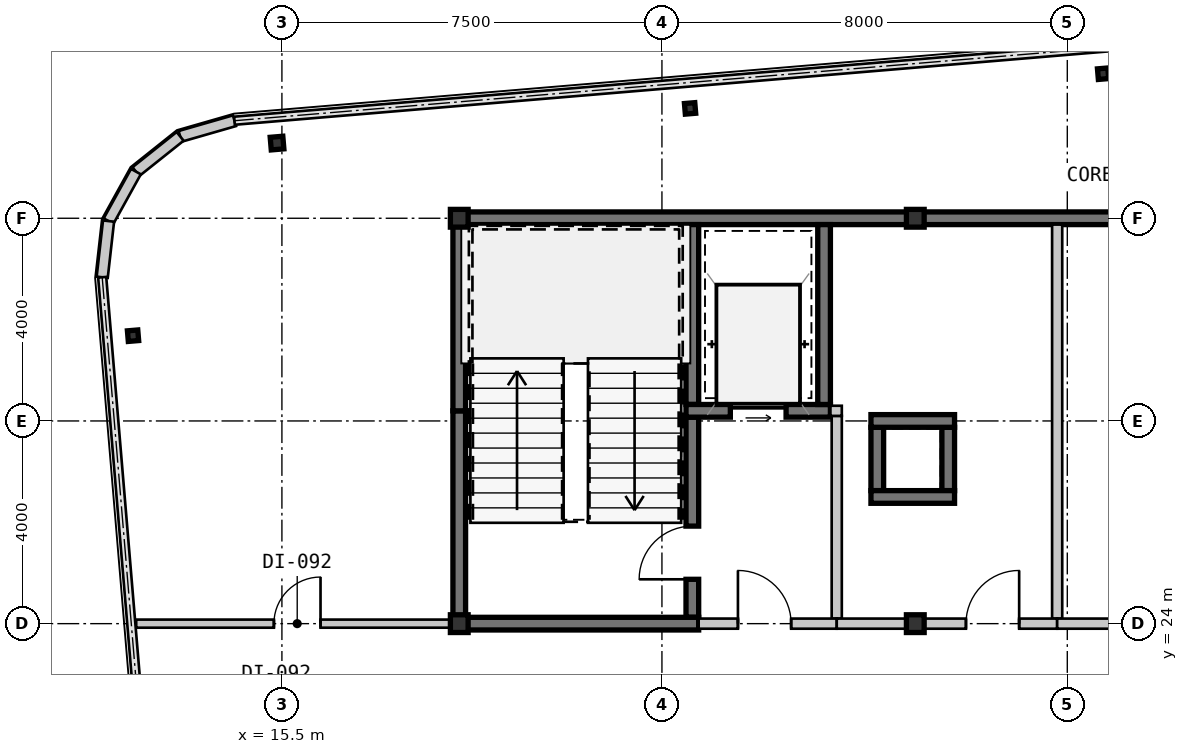
"""IFC4 building model, lengths in metres.
Left out: names, types, materials, properties, quantities, classifications, styles, units other than length and angle.
Written with IfcOpenShell. Run it as: python <this file> out.ifc"""

import sys

from ifc_helpers import new_model, si_unit, direction, frame, frame_2d, origin, origin_2d, place, context, subcontext, project, spatial, rectangle, hollow_rectangle, i_section, extrude, source, transform, mapped, element, fill, save


model = new_model("IFC4")
c1 = context("Model", 3, precision=1e-05, world=origin(), true_north=direction((0.0, 1.0)))
c2 = subcontext(c1, "Body", "Model", "MODEL_VIEW")
j1 = project(units=[si_unit("LENGTHUNIT", "METRE"), si_unit("PLANEANGLEUNIT", "RADIAN")], contexts=[c1])
p1 = place(None, origin())
s1 = spatial("IfcSite", under=j1, at=p1, CompositionType="ELEMENT")
p2 = place(p1, origin())
s2 = spatial("IfcBuilding", under=s1, at=p2, CompositionType="ELEMENT")
p3 = place(p2, frame((0.0, 0.0, 191.45)))
s3 = spatial("IfcBuildingStorey", under=s2, at=p3, CompositionType="ELEMENT", Elevation=191.45)
m1 = source(origin(), c2, "Body", "SweptSolid", [
    extrude(hollow_rectangle(XDim=0.35, YDim=0.35, WallThickness=0.016, at=origin_2d()), origin(), (0.0, 0.0, 1.0), 3.15),
])
for number, where, z_axis, x_axis in (
    (1, (19.0, 24.0, 0.0), (0.0, 0.0, 1.0), (1.0, 0.0, 0.0)),
    (2, (28.0, 24.0, 0.0), (0.0, 0.0, 1.0), (1.0, 0.0, 0.0)),
    (3, (19.0, 32.0, 0.0), (0.0, 0.0, 1.0), (1.0, 0.0, 0.0)),
    (4, (28.0, 32.0, 0.0), (0.0, 0.0, 1.0), (1.0, 0.0, 0.0)),
):
    element("IfcColumn", number, at=place(p3, frame(where, z_axis=z_axis, x_axis=x_axis)), inside=s3, PredefinedType="COLUMN", context=c2, shape_type="MappedRepresentation", body=[
        mapped(m1, transform((0.0, 0.0, 0.0), scale=1.0)),
    ])
m2 = source(origin(), c2, "Body", "SweptSolid", [
    extrude(hollow_rectangle(XDim=0.25, YDim=0.25, WallThickness=0.01, at=origin_2d()), origin(), (0.0, 0.0, 1.0), 3.15),
])
p4 = place(p3, frame((15.404, 33.484, 0.0), z_axis=(0.0, 0.0, 1.0), x_axis=(0.99649285925, 0.083677843332, 0.0)))
e5 = element("IfcColumn", 5, at=p4, inside=s3, PredefinedType="COLUMN", context=c2, shape_type="MappedRepresentation", body=[
    mapped(m2, transform((0.0, 0.0, 0.0), scale=1.0)),
])
m3 = source(origin(), c2, "Body", "SweptSolid", [
    extrude(i_section(OverallWidth=0.205, OverallDepth=0.21, WebThickness=0.009, FlangeThickness=0.014, at=origin_2d()), origin(), (0.0, 0.0, 1.0), 3.15),
])
for number, where, z_axis, x_axis in (
    (6, (23.555, 34.168, 0.0), (0.0, 0.0, 1.0), (0.996, 0.084, 0.0)),
    (7, (31.706, 34.853, 0.0), (0.0, 0.0, 1.0), (0.996, 0.084, 0.0)),
    (8, (12.562, 29.682, 0.0), (0.0, 0.0, 1.0), (0.996, 0.084, 0.0)),
):
    element("IfcColumn", number, at=place(p3, frame(where, z_axis=z_axis, x_axis=x_axis)), inside=s3, PredefinedType="COLUMN", context=c2, shape_type="MappedRepresentation", body=[
        mapped(m3, transform((0.0, 0.0, 0.0), scale=1.0)),
    ])
m4 = source(origin(), c2, "Body", "SweptSolid", [
    extrude(rectangle(XDim=1.116, YDim=0.22, at=frame_2d((0.558, 0.0))), origin(), (0.0, 0.0, 1.0), 2.93),
])
p5 = place(p3, frame((14.564, 33.925, 0.0), z_axis=(0.0, 0.0, 1.0), x_axis=(-0.961010464297, -0.276512002475, 0.0)))
e9 = element("IfcWall", 9, at=p5, inside=s3, PredefinedType="SOLIDWALL", context=c2, shape_type="MappedRepresentation", body=[
    mapped(m4, transform((0.0, 0.0, 0.0), scale=1.0)),
])
m5 = source(origin(), c2, "Body", "SweptSolid", [
    extrude(rectangle(XDim=1.116, YDim=0.22, at=frame_2d((0.558, 0.0))), origin(), (0.0, 0.0, 1.0), 2.93),
])
p6 = place(p3, frame((13.491, 33.616, 0.0), z_axis=(0.0, 0.0, 1.0), x_axis=(-0.782062884215, -0.623199522732, 0.0)))
e10 = element("IfcWall", 10, at=p6, inside=s3, PredefinedType="SOLIDWALL", context=c2, shape_type="MappedRepresentation", body=[
    mapped(m5, transform((0.0, 0.0, 0.0), scale=1.0)),
])
for number, where, z_axis, x_axis in (
    (11, (12.619, 32.921, 0.0), (0.0, 0.0, 1.0), (-0.484, -0.875, 0.0)),
    (12, (12.079, 31.944, 0.0), (0.0, 0.0, 1.0), (-0.112, -0.994, 0.0)),
):
    element("IfcWall", number, at=place(p3, frame(where, z_axis=z_axis, x_axis=x_axis)), inside=s3, PredefinedType="SOLIDWALL", context=c2, shape_type="MappedRepresentation", body=[
        mapped(m4, transform((0.0, 0.0, 0.0), scale=1.0)),
    ])
m6 = source(origin(), c2, "Body", "SweptSolid", [
    extrude(rectangle(XDim=9.125, YDim=0.25, at=frame_2d((4.562, 0.0))), origin(), (0.0, 0.0, 1.0), 2.93),
])
p7 = place(p3, frame((18.875, 32.0, 0.0), z_axis=(0.0, 0.0, 1.0), x_axis=(1.0, 0.0, 0.0)))
e13 = element("IfcWall", 13, at=p7, inside=s3, PredefinedType="SHEAR", context=c2, shape_type="MappedRepresentation", body=[
    mapped(m6, transform((0.0, 0.0, 0.0), scale=1.0)),
])
m7 = source(origin(), c2, "Body", "SweptSolid", [
    extrude(rectangle(XDim=11.2, YDim=0.25, at=frame_2d((5.6, 0.0))), origin(), (0.0, 0.0, 1.0), 2.93),
])
p8 = place(p3, frame((28.0, 32.0, 0.0), z_axis=(0.0, 0.0, 1.0), x_axis=(1.0, 0.0, 0.0)))
e14 = element("IfcWall", 14, at=p8, inside=s3, PredefinedType="SHEAR", context=c2, shape_type="MappedRepresentation", body=[
    mapped(m7, transform((0.0, 0.0, 0.0), scale=1.0)),
])
m8 = source(origin(), c2, "Body", "SweptSolid", [
    extrude(rectangle(XDim=4.075, YDim=0.25, at=frame_2d((2.038, 0.0))), origin(), (0.0, 0.0, 1.0), 2.93),
])
p9 = place(p3, frame((19.0, 24.125, 0.0), z_axis=(0.0, 0.0, 1.0), x_axis=(0.0, 1.0, 0.0)))
e15 = element("IfcWall", 15, at=p9, inside=s3, PredefinedType="SHEAR", context=c2, shape_type="MappedRepresentation", body=[
    mapped(m8, transform((0.0, 0.0, 0.0), scale=1.0)),
])
m9 = source(origin(), c2, "Body", "SweptSolid", [
    extrude(rectangle(XDim=3.675, YDim=0.25, at=frame_2d((1.837, 0.0))), origin(), (0.0, 0.0, 1.0), 2.93),
])
p10 = place(p3, frame((19.0, 28.2, 0.0), z_axis=(0.0, 0.0, 1.0), x_axis=(0.0, 1.0, 0.0)))
e16 = element("IfcWall", 16, at=p10, inside=s3, PredefinedType="SHEAR", context=c2, shape_type="MappedRepresentation", body=[
    mapped(m9, transform((0.0, 0.0, 0.0), scale=1.0)),
])
m10 = source(origin(), c2, "Body", "SweptSolid", [
    extrude(rectangle(XDim=3.55, YDim=0.25, at=frame_2d((1.775, 0.0))), origin(), (0.0, 0.0, 1.0), 2.93),
])
p11 = place(p3, frame((23.6, 28.325, 0.0), z_axis=(0.0, 0.0, 1.0), x_axis=(0.0, 1.0, 0.0)))
e17 = element("IfcWall", 17, at=p11, inside=s3, PredefinedType="SHEAR", context=c2, shape_type="MappedRepresentation", body=[
    mapped(m10, transform((0.0, 0.0, 0.0), scale=1.0)),
])
m11 = source(origin(), c2, "Body", "SweptSolid", [
    extrude(rectangle(XDim=3.95, YDim=0.25, at=frame_2d((1.975, 0.0))), origin(), (0.0, 0.0, 1.0), 2.93),
])
p12 = place(p3, frame((23.6, 24.125, 0.0), z_axis=(0.0, 0.0, 1.0), x_axis=(0.0, 1.0, 0.0)))
e18 = element("IfcWall", 18, at=p12, inside=s3, PredefinedType="SHEAR", context=c2, shape_type="MappedRepresentation", body=[
    mapped(m11, transform((0.0, 0.0, 0.0), scale=1.0)),
])
m12 = source(origin(), c2, "Body", "SweptSolid", [
    extrude(rectangle(XDim=1.05, YDim=2.1, at=frame_2d((0.525, 1.05))), frame((0.0, 0.135, 0.0), z_axis=(0.0, -1.0, 0.0), x_axis=(1.0, 0.0, 0.0)), (0.0, 0.0, 1.0), 0.27),
])
p13 = place(p12, frame((0.75, 0.0, 0.0)))
e19 = element("IfcOpeningElement", 19, at=p13, cuts=e18, PredefinedType="OPENING", context=c2, shape_type="MappedRepresentation", body=[
    mapped(m12, transform((0.0, 0.0, 0.0), scale=1.0)),
])
m13 = source(origin(), c2, "Body", "SweptSolid", [
    extrude(rectangle(XDim=4.85, YDim=0.25, at=frame_2d((2.425, 0.0))), origin(), (0.0, 0.0, 1.0), 2.93),
])
p14 = place(p3, frame((18.875, 24.0, 0.0), z_axis=(0.0, 0.0, 1.0), x_axis=(1.0, 0.0, 0.0)))
e20 = element("IfcWall", 20, at=p14, inside=s3, PredefinedType="SHEAR", context=c2, shape_type="MappedRepresentation", body=[
    mapped(m13, transform((0.0, 0.0, 0.0), scale=1.0)),
])
m14 = source(origin(), c2, "Body", "SweptSolid", [
    extrude(rectangle(XDim=2.85, YDim=0.25, at=frame_2d((1.425, 0.0))), origin(), (0.0, 0.0, 1.0), 2.93),
])
p15 = place(p3, frame((23.475, 28.2, 0.0), z_axis=(0.0, 0.0, 1.0), x_axis=(1.0, 0.0, 0.0)))
e21 = element("IfcWall", 21, at=p15, inside=s3, PredefinedType="SHEAR", context=c2, shape_type="MappedRepresentation", body=[
    mapped(m14, transform((0.0, 0.0, 0.0), scale=1.0)),
])
m15 = source(origin(), c2, "Body", "SweptSolid", [
    extrude(rectangle(XDim=1.1, YDim=2.15, at=frame_2d((0.55, 1.075))), frame((0.0, 0.135, 0.0), z_axis=(0.0, -1.0, 0.0), x_axis=(1.0, 0.0, 0.0)), (0.0, 0.0, 1.0), 0.27),
])
p16 = place(p15, frame((0.875, 0.0, 0.0)))
e22 = element("IfcOpeningElement", 22, at=p16, cuts=e21, PredefinedType="OPENING", context=c2, shape_type="MappedRepresentation", body=[
    mapped(m15, transform((0.0, 0.0, 0.0), scale=1.0)),
])
p17 = place(p3, frame((26.2, 28.325, 0.0), z_axis=(0.0, 0.0, 1.0), x_axis=(0.0, 1.0, 0.0)))
e23 = element("IfcWall", 23, at=p17, inside=s3, PredefinedType="SHEAR", context=c2, shape_type="MappedRepresentation", body=[
    mapped(m10, transform((0.0, 0.0, 0.0), scale=1.0)),
])
m16 = source(origin(), c2, "Body", "SweptSolid", [
    extrude(rectangle(XDim=4.0, YDim=0.2, at=frame_2d((2.0, 0.0))), origin(), (0.0, 0.0, 1.0), 2.93),
])
p18 = place(p3, frame((26.45, 24.1, 0.0), z_axis=(0.0, 0.0, 1.0), x_axis=(0.0, 1.0, 0.0)))
e24 = element("IfcWall", 24, at=p18, inside=s3, PredefinedType="SOLIDWALL", context=c2, shape_type="MappedRepresentation", body=[
    mapped(m16, transform((0.0, 0.0, 0.0), scale=1.0)),
])
m17 = source(origin(), c2, "Body", "SweptSolid", [
    extrude(rectangle(XDim=2.725, YDim=0.2, at=frame_2d((1.362, 0.0))), origin(), (0.0, 0.0, 1.0), 2.47),
])
p19 = place(p3, frame((23.725, 24.0, 0.0), z_axis=(0.0, 0.0, 1.0), x_axis=(1.0, 0.0, 0.0)))
e25 = element("IfcWall", 25, at=p19, inside=s3, PredefinedType="SOLIDWALL", context=c2, shape_type="MappedRepresentation", body=[
    mapped(m17, transform((0.0, 0.0, 0.0), scale=1.0)),
])
m18 = source(origin(), c2, "Body", "SweptSolid", [
    extrude(rectangle(XDim=1.05, YDim=2.1, at=frame_2d((0.525, 1.05))), frame((0.0, 0.11, 0.0), z_axis=(0.0, -1.0, 0.0), x_axis=(1.0, 0.0, 0.0)), (0.0, 0.0, 1.0), 0.22),
])
p20 = place(p19, frame((0.775, 0.0, 0.0)))
e26 = element("IfcOpeningElement", 26, at=p20, cuts=e25, PredefinedType="OPENING", context=c2, shape_type="MappedRepresentation", body=[
    mapped(m18, transform((0.0, 0.0, 0.0), scale=1.0)),
])
m19 = source(origin(), c2, "Body", "SweptSolid", [
    extrude(rectangle(XDim=1.25, YDim=0.25, at=frame_2d((0.625, 0.0))), origin(), (0.0, 0.0, 1.0), 2.93),
])
for number, where, z_axis, x_axis in (
    (27, (28.65, 26.625, 0.0), (0.0, 0.0, 1.0), (0.0, 1.0, 0.0)),
    (28, (27.25, 27.875, 0.0), (0.0, 0.0, 1.0), (0.0, -1.0, 0.0)),
):
    element("IfcWall", number, at=place(p3, frame(where, z_axis=z_axis, x_axis=x_axis)), inside=s3, PredefinedType="SHEAR", context=c2, shape_type="MappedRepresentation", body=[
        mapped(m19, transform((0.0, 0.0, 0.0), scale=1.0)),
    ])
m20 = source(origin(), c2, "Body", "SweptSolid", [
    extrude(rectangle(XDim=1.65, YDim=0.25, at=frame_2d((0.825, 0.0))), origin(), (0.0, 0.0, 1.0), 2.93),
])
for number, where, z_axis, x_axis in (
    (29, (28.775, 28.0, 0.0), (0.0, 0.0, 1.0), (-1.0, 0.0, 0.0)),
    (30, (27.125, 26.5, 0.0), (0.0, 0.0, 1.0), (1.0, 0.0, 0.0)),
):
    element("IfcWall", number, at=place(p3, frame(where, z_axis=z_axis, x_axis=x_axis)), inside=s3, PredefinedType="SHEAR", context=c2, shape_type="MappedRepresentation", body=[
        mapped(m20, transform((0.0, 0.0, 0.0), scale=1.0)),
    ])
m21 = source(origin(), c2, "Body", "SweptSolid", [
    extrude(rectangle(XDim=7.775, YDim=0.2, at=frame_2d((3.887, 0.0))), origin(), (0.0, 0.0, 1.0), 2.93),
])
p21 = place(p3, frame((30.8, 31.875, 0.0), z_axis=(0.0, 0.0, 1.0), x_axis=(0.0, -1.0, 0.0)))
e31 = element("IfcWall", 31, at=p21, inside=s3, PredefinedType="SOLIDWALL", context=c2, shape_type="MappedRepresentation", body=[
    mapped(m21, transform((0.0, 0.0, 0.0), scale=1.0)),
])
m22 = source(origin(), c2, "Body", "SweptSolid", [
    extrude(rectangle(XDim=4.35, YDim=0.2, at=frame_2d((2.175, 0.0))), origin(), (0.0, 0.0, 1.0), 2.47),
])
p22 = place(p3, frame((30.8, 24.0, 0.0), z_axis=(0.0, 0.0, 1.0), x_axis=(-1.0, 0.0, 0.0)))
e32 = element("IfcWall", 32, at=p22, inside=s3, PredefinedType="SOLIDWALL", context=c2, shape_type="MappedRepresentation", body=[
    mapped(m22, transform((0.0, 0.0, 0.0), scale=1.0)),
])
p23 = place(p22, frame((0.75, 0.0, 0.0)))
e33 = element("IfcOpeningElement", 33, at=p23, cuts=e32, PredefinedType="OPENING", context=c2, shape_type="MappedRepresentation", body=[
    mapped(m18, transform((0.0, 0.0, 0.0), scale=1.0)),
])
m23 = source(origin(), c2, "Body", "SweptSolid", [
    extrude(rectangle(XDim=4.35, YDim=0.2, at=frame_2d((2.175, 0.0))), origin(), (0.0, 0.0, 1.0), 2.47),
])
p24 = place(p3, frame((35.15, 24.0, 0.0), z_axis=(0.0, 0.0, 1.0), x_axis=(-1.0, 0.0, 0.0)))
e34 = element("IfcWall", 34, at=p24, inside=s3, PredefinedType="SOLIDWALL", context=c2, shape_type="MappedRepresentation", body=[
    mapped(m23, transform((0.0, 0.0, 0.0), scale=1.0)),
])
p25 = place(p24, frame((1.65, 0.0, 0.0)))
e35 = element("IfcOpeningElement", 35, at=p25, cuts=e34, PredefinedType="OPENING", context=c2, shape_type="MappedRepresentation", body=[
    mapped(m18, transform((0.0, 0.0, 0.0), scale=1.0)),
])
m24 = source(origin(), c2, "Body", "SweptSolid", [
    extrude(rectangle(XDim=6.251, YDim=0.16, at=frame_2d((3.125, 0.0))), origin(), (0.0, 0.0, 1.0), 2.93),
])
p26 = place(p3, frame((12.624, 24.0, 0.0), z_axis=(0.0, 0.0, 1.0), x_axis=(1.0, 0.0, 0.0)))
e36 = element("IfcWall", 36, at=p26, inside=s3, PredefinedType="PARTITIONING", context=c2, shape_type="MappedRepresentation", body=[
    mapped(m24, transform((0.0, 0.0, 0.0), scale=1.0)),
])
m25 = source(origin(), c2, "Body", "SweptSolid", [
    extrude(rectangle(XDim=0.92, YDim=2.1, at=frame_2d((0.46, 1.05))), frame((0.0, 0.09, 0.0), z_axis=(0.0, -1.0, 0.0), x_axis=(1.0, 0.0, 0.0)), (0.0, 0.0, 1.0), 0.18),
])
p27 = place(p26, frame((2.718, 0.0, 0.0)))
e37 = element("IfcOpeningElement", 37, at=p27, cuts=e36, PredefinedType="OPENING", context=c2, shape_type="MappedRepresentation", body=[
    mapped(m25, transform((0.0, 0.0, 0.0), scale=1.0)),
])
m26 = source(origin(), c2, "Body", "SweptSolid", [
    extrude(rectangle(XDim=0.225, YDim=0.2, at=frame_2d((0.113, 0.0))), origin(), (0.0, 0.0, 1.0), 2.93),
])
p28 = place(p3, frame((26.325, 28.2, 0.0), z_axis=(0.0, 0.0, 1.0), x_axis=(1.0, 0.0, 0.0)))
e38 = element("IfcWall", 38, at=p28, inside=s3, PredefinedType="SOLIDWALL", context=c2, shape_type="MappedRepresentation", body=[
    mapped(m26, transform((0.0, 0.0, 0.0), scale=1.0)),
])
m27 = source(origin(), c2, "Body", "SweptSolid", [
    extrude(rectangle(XDim=1.05, YDim=2.1, at=frame_2d((0.525, 1.05))), frame((0.0, 0.025, 0.0), z_axis=(0.0, -1.0, 0.0), x_axis=(1.0, 0.0, 0.0)), (0.0, 0.0, 1.0), 0.05),
])
p29 = place(p13, origin())
e39 = element("IfcDoor", 39, at=p29, inside=s3, OperationType="SINGLE_SWING_LEFT", PredefinedType="DOOR", context=c2, shape_type="MappedRepresentation", body=[
    mapped(m27, transform((0.0, 0.0, 0.0), scale=1.0)),
])
fill(e19, e39)
m28 = source(origin(), c2, "Body", "SweptSolid", [
    extrude(rectangle(XDim=1.1, YDim=2.15, at=frame_2d((0.55, 1.075))), frame((0.0, 0.025, 0.0), z_axis=(0.0, -1.0, 0.0), x_axis=(1.0, 0.0, 0.0)), (0.0, 0.0, 1.0), 0.05),
])
p30 = place(p16, origin())
e40 = element("IfcDoor", 40, at=p30, inside=s3, OperationType="SLIDING_TO_LEFT", PredefinedType="DOOR", context=c2, shape_type="MappedRepresentation", body=[
    mapped(m28, transform((0.0, 0.0, 0.0), scale=1.0)),
])
fill(e22, e40)
p31 = place(p20, origin())
e41 = element("IfcDoor", 41, at=p31, inside=s3, OperationType="SINGLE_SWING_LEFT", PredefinedType="DOOR", context=c2, shape_type="MappedRepresentation", body=[
    mapped(m27, transform((0.0, 0.0, 0.0), scale=1.0)),
])
fill(e26, e41)
p32 = place(p23, frame((1.05, 0.0, 0.0), z_axis=(0.0, 0.0, 1.0), x_axis=(-1.0, 0.0, 0.0)))
e42 = element("IfcDoor", 42, at=p32, inside=s3, OperationType="SINGLE_SWING_RIGHT", PredefinedType="DOOR", context=c2, shape_type="MappedRepresentation", body=[
    mapped(m27, transform((0.0, 0.0, 0.0), scale=1.0)),
])
fill(e33, e42)
m29 = source(origin(), c2, "Body", "SweptSolid", [
    extrude(rectangle(XDim=0.92, YDim=2.1, at=frame_2d((0.46, 1.05))), frame((0.0, 0.025, 0.0), z_axis=(0.0, -1.0, 0.0), x_axis=(1.0, 0.0, 0.0)), (0.0, 0.0, 1.0), 0.05),
])
p33 = place(p27, origin())
e43 = element("IfcDoor", 43, at=p33, inside=s3, OperationType="SINGLE_SWING_RIGHT", PredefinedType="DOOR", context=c2, shape_type="MappedRepresentation", body=[
    mapped(m29, transform((0.0, 0.0, 0.0), scale=1.0)),
])
fill(e37, e43)
save(model, sys.argv[1])
